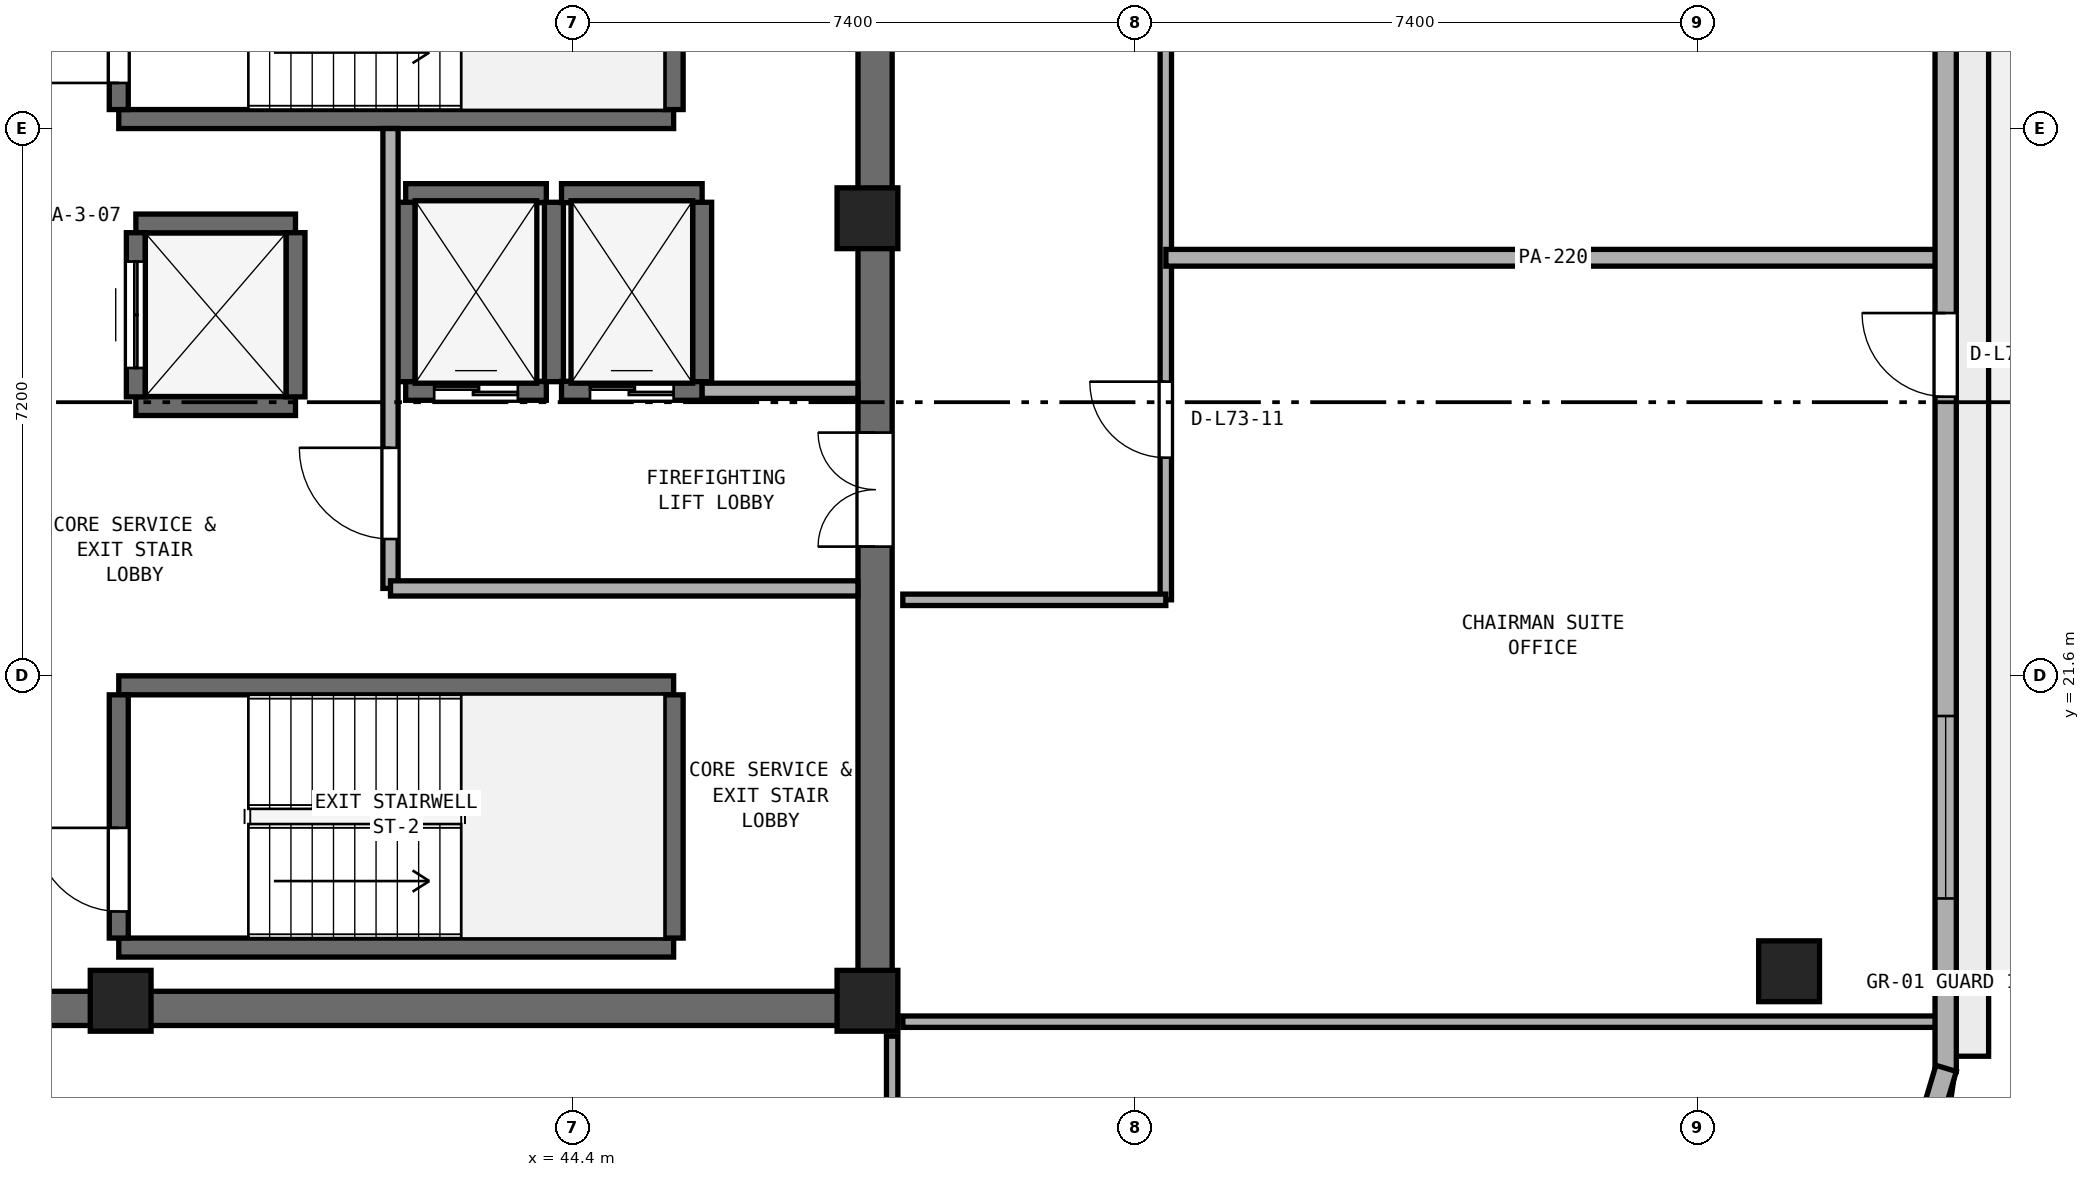
"""IFC4 building model, lengths in metres.
Left out: names, types, materials, properties, quantities, classifications, styles, units other than length and angle.
Written with IfcOpenShell. Run it as: python <this file> out.ifc"""

import sys

from ifc_helpers import new_model, si_unit, direction, frame, frame_2d, origin, origin_2d, place, context, subcontext, project, spatial, rectangle, extrude, element, fill, save


model = new_model("IFC4")
c1 = context("Model", 3, precision=1e-05, world=origin(), true_north=direction((0.0, 1.0)))
c2 = subcontext(c1, "Body", "Model", "MODEL_VIEW")
j1 = project(units=[si_unit("LENGTHUNIT", "METRE"), si_unit("PLANEANGLEUNIT", "RADIAN")], contexts=[c1])
p1 = place(None, origin())
s1 = spatial("IfcSite", under=j1, at=p1, CompositionType="ELEMENT")
p2 = place(p1, origin())
s2 = spatial("IfcBuilding", under=s1, at=p2, CompositionType="ELEMENT")
p3 = place(p2, frame((0.0, 0.0, 285.8)))
s3 = spatial("IfcBuildingStorey", under=s2, at=p3, CompositionType="ELEMENT", Elevation=285.8)
p4 = place(p3, frame((25.4, 17.225, 0.0), z_axis=(0.0, 0.0, 1.0), x_axis=(1.0, 0.0, 0.0)))
e1 = element("IfcWall", 1, at=p4, inside=s3, PredefinedType="SHEAR", context=c2, shape_type="SweptSolid", body=[
    extrude(rectangle(XDim=23.2, YDim=0.45, at=frame_2d((11.6, 0.0))), origin(), (0.0, 0.0, 1.0), 3.54),
])
p5 = place(p3, frame((48.375, 17.45, 0.0), z_axis=(0.0, 0.0, 1.0), x_axis=(0.0, 1.0, 0.0)))
e2 = element("IfcWall", 2, at=p5, inside=s3, PredefinedType="SHEAR", context=c2, shape_type="SweptSolid", body=[
    extrude(rectangle(XDim=15.5, YDim=0.45, at=frame_2d((7.75, 0.0))), origin(), (0.0, 0.0, 1.0), 3.54),
])
p6 = place(p5, frame((5.85, 0.0, 0.0)))
e3 = element("IfcOpeningElement", 3, at=p6, cuts=e2, PredefinedType="OPENING", context=c2, shape_type="SweptSolid", body=[
    extrude(rectangle(XDim=1.5, YDim=2.15, at=frame_2d((0.75, 1.075))), frame((0.0, 0.235, 0.0), z_axis=(0.0, -1.0, 0.0), x_axis=(1.0, 0.0, 0.0)), (0.0, 0.0, 1.0), 0.47),
])
for number, where, z_axis, x_axis in (
    (4, (38.45, 17.325, 0.0), (0.0, 0.0, 1.0), (1.0, 0.0, 0.0)),
    (5, (48.275, 17.325, 0.0), (0.0, 0.0, 1.0), (1.0, 0.0, 0.0)),
    (6, (48.275, 27.62, 0.0), (0.0, 0.0, 1.0), (1.0, 0.0, 0.0)),
):
    element("IfcColumn", number, at=place(p3, frame(where, z_axis=z_axis, x_axis=x_axis)), inside=s3, PredefinedType="PILASTER", context=c2, shape_type="SweptSolid", body=[
        extrude(rectangle(XDim=0.8, YDim=0.8, at=origin_2d()), origin(), (0.0, 0.0, 1.0), 3.8),
    ])
p7 = place(p3, frame((60.4, 17.714, 0.0), z_axis=(0.0, 0.0, 1.0), x_axis=(1.0, 0.0, 0.0)))
e7 = element("IfcColumn", 7, at=p7, inside=s3, PredefinedType="COLUMN", context=c2, shape_type="SweptSolid", body=[
    extrude(rectangle(XDim=0.8, YDim=0.8, at=origin_2d()), origin(), (0.0, 0.0, 1.0), 3.8),
])
p8 = place(p3, frame((38.425, 28.925, 0.0), z_axis=(0.0, 0.0, 1.0), x_axis=(1.0, 0.0, 0.0)))
e8 = element("IfcWall", 8, at=p8, inside=s3, PredefinedType="SHEAR", context=c2, shape_type="SweptSolid", body=[
    extrude(rectangle(XDim=7.3, YDim=0.25, at=frame_2d((3.65, 0.0))), origin(), (0.0, 0.0, 1.0), 3.54),
])
p9 = place(p3, frame((38.425, 29.05, 0.0), z_axis=(0.0, 0.0, 1.0), x_axis=(0.0, 1.0, 0.0)))
e9 = element("IfcWall", 9, at=p9, inside=s3, PredefinedType="SHEAR", context=c2, shape_type="SweptSolid", body=[
    extrude(rectangle(XDim=3.2, YDim=0.25, at=frame_2d((1.6, 0.0))), origin(), (0.0, 0.0, 1.0), 3.54),
])
p10 = place(p9, frame((0.35, 0.0, 0.0)))
e10 = element("IfcOpeningElement", 10, at=p10, cuts=e9, PredefinedType="OPENING", context=c2, shape_type="SweptSolid", body=[
    extrude(rectangle(XDim=1.1, YDim=2.15, at=frame_2d((0.55, 1.075))), frame((0.0, 0.135, 0.0), z_axis=(0.0, -1.0, 0.0), x_axis=(1.0, 0.0, 0.0)), (0.0, 0.0, 1.0), 0.27),
])
p11 = place(p3, frame((45.725, 29.05, 0.0), z_axis=(0.0, 0.0, 1.0), x_axis=(0.0, 1.0, 0.0)))
e11 = element("IfcWall", 11, at=p11, inside=s3, PredefinedType="SHEAR", context=c2, shape_type="SweptSolid", body=[
    extrude(rectangle(XDim=3.2, YDim=0.25, at=frame_2d((1.6, 0.0))), origin(), (0.0, 0.0, 1.0), 3.54),
])
for number, where, z_axis, x_axis in (
    (12, (38.425, 18.025, 0.0), (0.0, 0.0, 1.0), (1.0, 0.0, 0.0)),
    (13, (38.425, 21.475, 0.0), (0.0, 0.0, 1.0), (1.0, 0.0, 0.0)),
):
    element("IfcWall", number, at=place(p3, frame(where, z_axis=z_axis, x_axis=x_axis)), inside=s3, PredefinedType="SHEAR", context=c2, shape_type="SweptSolid", body=[
        extrude(rectangle(XDim=7.3, YDim=0.25, at=frame_2d((3.65, 0.0))), origin(), (0.0, 0.0, 1.0), 3.54),
    ])
p12 = place(p3, frame((38.425, 18.15, 0.0), z_axis=(0.0, 0.0, 1.0), x_axis=(0.0, 1.0, 0.0)))
e14 = element("IfcWall", 14, at=p12, inside=s3, PredefinedType="SHEAR", context=c2, shape_type="SweptSolid", body=[
    extrude(rectangle(XDim=3.2, YDim=0.25, at=frame_2d((1.6, 0.0))), origin(), (0.0, 0.0, 1.0), 3.54),
])
p13 = place(p12, frame((0.35, 0.0, 0.0)))
e15 = element("IfcOpeningElement", 15, at=p13, cuts=e14, PredefinedType="OPENING", context=c2, shape_type="SweptSolid", body=[
    extrude(rectangle(XDim=1.1, YDim=2.15, at=frame_2d((0.55, 1.075))), frame((0.0, 0.135, 0.0), z_axis=(0.0, -1.0, 0.0), x_axis=(1.0, 0.0, 0.0)), (0.0, 0.0, 1.0), 0.27),
])
p14 = place(p3, frame((45.725, 18.15, 0.0), z_axis=(0.0, 0.0, 1.0), x_axis=(0.0, 1.0, 0.0)))
e16 = element("IfcWall", 16, at=p14, inside=s3, PredefinedType="SHEAR", context=c2, shape_type="SweptSolid", body=[
    extrude(rectangle(XDim=3.2, YDim=0.25, at=frame_2d((1.6, 0.0))), origin(), (0.0, 0.0, 1.0), 3.54),
])
p15 = place(p3, frame((42.2, 25.35, 0.0), z_axis=(0.0, 0.0, 1.0), x_axis=(1.0, 0.0, 0.0)))
e17 = element("IfcWall", 17, at=p15, inside=s3, PredefinedType="SHEAR", context=c2, shape_type="SweptSolid", body=[
    extrude(rectangle(XDim=1.85, YDim=0.25, at=frame_2d((0.925, 0.0))), origin(), (0.0, 0.0, 1.0), 3.54),
])
p16 = place(p15, frame((0.375, 0.0, 0.0)))
e18 = element("IfcOpeningElement", 18, at=p16, cuts=e17, PredefinedType="OPENING", context=c2, shape_type="SweptSolid", body=[
    extrude(rectangle(XDim=1.1, YDim=2.15, at=frame_2d((0.55, 1.075))), frame((0.0, 0.135, 0.0), z_axis=(0.0, -1.0, 0.0), x_axis=(1.0, 0.0, 0.0)), (0.0, 0.0, 1.0), 0.27),
])
p17 = place(p3, frame((42.2, 27.95, 0.0), z_axis=(0.0, 0.0, 1.0), x_axis=(1.0, 0.0, 0.0)))
e19 = element("IfcWall", 19, at=p17, inside=s3, PredefinedType="SHEAR", context=c2, shape_type="SweptSolid", body=[
    extrude(rectangle(XDim=1.85, YDim=0.25, at=frame_2d((0.925, 0.0))), origin(), (0.0, 0.0, 1.0), 3.54),
])
for number, where, z_axis, x_axis in (
    (20, (42.2, 25.47, 0.0), (0.0, 0.0, 1.0), (0.0, 1.0, 0.0)),
    (21, (44.15, 25.47, 0.0), (0.0, 0.0, 1.0), (0.0, 1.0, 0.0)),
):
    element("IfcWall", number, at=place(p3, frame(where, z_axis=z_axis, x_axis=x_axis)), inside=s3, PredefinedType="SHEAR", context=c2, shape_type="SweptSolid", body=[
        extrude(rectangle(XDim=2.36, YDim=0.25, at=frame_2d((1.18, 0.0))), origin(), (0.0, 0.0, 1.0), 3.54),
    ])
p18 = place(p3, frame((44.25, 25.35, 0.0), z_axis=(0.0, 0.0, 1.0), x_axis=(1.0, 0.0, 0.0)))
e22 = element("IfcWall", 22, at=p18, inside=s3, PredefinedType="SHEAR", context=c2, shape_type="SweptSolid", body=[
    extrude(rectangle(XDim=1.85, YDim=0.25, at=frame_2d((0.925, 0.0))), origin(), (0.0, 0.0, 1.0), 3.54),
])
p19 = place(p18, frame((0.375, 0.0, 0.0)))
e23 = element("IfcOpeningElement", 23, at=p19, cuts=e22, PredefinedType="OPENING", context=c2, shape_type="SweptSolid", body=[
    extrude(rectangle(XDim=1.1, YDim=2.15, at=frame_2d((0.55, 1.075))), frame((0.0, 0.135, 0.0), z_axis=(0.0, -1.0, 0.0), x_axis=(1.0, 0.0, 0.0)), (0.0, 0.0, 1.0), 0.27),
])
p20 = place(p3, frame((44.25, 27.95, 0.0), z_axis=(0.0, 0.0, 1.0), x_axis=(1.0, 0.0, 0.0)))
e24 = element("IfcWall", 24, at=p20, inside=s3, PredefinedType="SHEAR", context=c2, shape_type="SweptSolid", body=[
    extrude(rectangle(XDim=1.85, YDim=0.25, at=frame_2d((0.925, 0.0))), origin(), (0.0, 0.0, 1.0), 3.54),
])
p21 = place(p3, frame((46.1, 25.47, 0.0), z_axis=(0.0, 0.0, 1.0), x_axis=(0.0, 1.0, 0.0)))
e25 = element("IfcWall", 25, at=p21, inside=s3, PredefinedType="SHEAR", context=c2, shape_type="SweptSolid", body=[
    extrude(rectangle(XDim=2.36, YDim=0.25, at=frame_2d((1.18, 0.0))), origin(), (0.0, 0.0, 1.0), 3.54),
])
for number, where, z_axis, x_axis in (
    (26, (38.65, 25.15, 0.0), (0.0, 0.0, 1.0), (1.0, 0.0, 0.0)),
    (27, (38.65, 27.55, 0.0), (0.0, 0.0, 1.0), (1.0, 0.0, 0.0)),
):
    element("IfcWall", number, at=place(p3, frame(where, z_axis=z_axis, x_axis=x_axis)), inside=s3, PredefinedType="SHEAR", context=c2, shape_type="SweptSolid", body=[
        extrude(rectangle(XDim=2.1, YDim=0.25, at=frame_2d((1.05, 0.0))), origin(), (0.0, 0.0, 1.0), 3.54),
    ])
p22 = place(p3, frame((38.65, 25.27, 0.0), z_axis=(0.0, 0.0, 1.0), x_axis=(0.0, 1.0, 0.0)))
e28 = element("IfcWall", 28, at=p22, inside=s3, PredefinedType="SHEAR", context=c2, shape_type="SweptSolid", body=[
    extrude(rectangle(XDim=2.16, YDim=0.25, at=frame_2d((1.08, 0.0))), origin(), (0.0, 0.0, 1.0), 3.54),
])
p23 = place(p22, frame((0.38, 0.0, 0.0)))
e29 = element("IfcOpeningElement", 29, at=p23, cuts=e28, PredefinedType="OPENING", context=c2, shape_type="SweptSolid", body=[
    extrude(rectangle(XDim=1.4, YDim=2.2, at=frame_2d((0.7, 1.1))), frame((0.0, 0.135, 0.0), z_axis=(0.0, -1.0, 0.0), x_axis=(1.0, 0.0, 0.0)), (0.0, 0.0, 1.0), 0.27),
])
p24 = place(p3, frame((40.75, 25.27, 0.0), z_axis=(0.0, 0.0, 1.0), x_axis=(0.0, 1.0, 0.0)))
e30 = element("IfcWall", 30, at=p24, inside=s3, PredefinedType="SHEAR", context=c2, shape_type="SweptSolid", body=[
    extrude(rectangle(XDim=2.16, YDim=0.25, at=frame_2d((1.08, 0.0))), origin(), (0.0, 0.0, 1.0), 3.54),
])
p25 = place(p3, frame((42.0, 22.75, 0.0), z_axis=(0.0, 0.0, 1.0), x_axis=(0.0, 1.0, 0.0)))
e31 = element("IfcWall", 31, at=p25, inside=s3, PredefinedType="SOLIDWALL", context=c2, shape_type="SweptSolid", body=[
    extrude(rectangle(XDim=6.05, YDim=0.2, at=frame_2d((3.025, 0.0))), origin(), (0.0, 0.0, 1.0), 3.54),
])
p26 = place(p25, frame((0.65, 0.0, 0.0)))
e32 = element("IfcOpeningElement", 32, at=p26, cuts=e31, PredefinedType="OPENING", context=c2, shape_type="SweptSolid", body=[
    extrude(rectangle(XDim=1.2, YDim=2.15, at=frame_2d((0.6, 1.075))), frame((0.0, 0.11, 0.0), z_axis=(0.0, -1.0, 0.0), x_axis=(1.0, 0.0, 0.0)), (0.0, 0.0, 1.0), 0.22),
])
p27 = place(p3, frame((42.0, 22.75, 0.0), z_axis=(0.0, 0.0, 1.0), x_axis=(1.0, 0.0, 0.0)))
e33 = element("IfcWall", 33, at=p27, inside=s3, PredefinedType="SOLIDWALL", context=c2, shape_type="SweptSolid", body=[
    extrude(rectangle(XDim=6.15, YDim=0.2, at=frame_2d((3.075, 0.0))), origin(), (0.0, 0.0, 1.0), 3.54),
])
p28 = place(p3, frame((46.1, 25.35, 0.0), z_axis=(0.0, 0.0, 1.0), x_axis=(1.0, 0.0, 0.0)))
e34 = element("IfcWall", 34, at=p28, inside=s3, PredefinedType="SOLIDWALL", context=c2, shape_type="SweptSolid", body=[
    extrude(rectangle(XDim=2.05, YDim=0.2, at=frame_2d((1.025, 0.0))), origin(), (0.0, 0.0, 1.0), 3.54),
])
p29 = place(p3, frame((52.2, 22.6, 0.0), z_axis=(0.0, 0.0, 1.0), x_axis=(0.0, 1.0, 0.0)))
e35 = element("IfcWall", 35, at=p29, inside=s3, PredefinedType="PARTITIONING", context=c2, shape_type="SweptSolid", body=[
    extrude(rectangle(XDim=22.153, YDim=0.15, at=frame_2d((11.076, 0.0))), origin(), (0.0, 0.0, 1.0), 3.54),
])
p30 = place(p29, frame((1.87, 0.0, 0.0)))
e36 = element("IfcOpeningElement", 36, at=p30, cuts=e35, PredefinedType="OPENING", context=c2, shape_type="SweptSolid", body=[
    extrude(rectangle(XDim=1.0, YDim=2.12, at=frame_2d((0.5, 1.06))), frame((0.0, 0.085, 0.0), z_axis=(0.0, -1.0, 0.0), x_axis=(1.0, 0.0, 0.0)), (0.0, 0.0, 1.0), 0.17),
])
p31 = place(p29, frame((8.95, 0.0, 0.0)))
e37 = element("IfcOpeningElement", 37, at=p31, cuts=e35, PredefinedType="OPENING", context=c2, shape_type="SweptSolid", body=[
    extrude(rectangle(XDim=1.0, YDim=2.12, at=frame_2d((0.5, 1.06))), frame((0.0, 0.085, 0.0), z_axis=(0.0, -1.0, 0.0), x_axis=(1.0, 0.0, 0.0)), (0.0, 0.0, 1.0), 0.17),
])
p32 = place(p3, frame((48.6, 13.4, 0.0), z_axis=(0.0, 0.0, 1.0), x_axis=(0.0, 1.0, 0.0)))
e38 = element("IfcWall", 38, at=p32, inside=s3, PredefinedType="PARTITIONING", context=c2, shape_type="SweptSolid", body=[
    extrude(rectangle(XDim=3.46, YDim=0.15, at=frame_2d((1.73, 0.0))), origin(), (0.0, 0.0, 1.0), 3.54),
])
p33 = place(p3, frame((48.74, 17.05, 0.0), z_axis=(0.0, 0.0, 1.0), x_axis=(1.0, 0.0, 0.0)))
e39 = element("IfcWall", 39, at=p33, inside=s3, PredefinedType="PARTITIONING", context=c2, shape_type="SweptSolid", body=[
    extrude(rectangle(XDim=13.655, YDim=0.15, at=frame_2d((6.828, 0.0))), origin(), (0.0, 0.0, 1.0), 2.923),
])
p34 = place(p3, frame((48.74, 22.6, 0.0), z_axis=(0.0, 0.0, 1.0), x_axis=(1.0, 0.0, 0.0)))
e40 = element("IfcWall", 40, at=p34, inside=s3, PredefinedType="PARTITIONING", context=c2, shape_type="SweptSolid", body=[
    extrude(rectangle(XDim=3.46, YDim=0.15, at=frame_2d((1.73, 0.0))), origin(), (0.0, 0.0, 1.0), 3.54),
])
p35 = place(p3, frame((52.201, 27.1, 0.0), z_axis=(0.0, 0.0, 1.0), x_axis=(1.0, 0.0, 0.0)))
e41 = element("IfcWall", 41, at=p35, inside=s3, PredefinedType="PARTITIONING", context=c2, shape_type="SweptSolid", body=[
    extrude(rectangle(XDim=10.194, YDim=0.22, at=frame_2d((5.097, 0.0))), origin(), (0.0, 0.0, 1.0), 3.54),
])
p36 = place(p3, frame((62.46, 16.396, 0.0), z_axis=(0.0, 0.0, 1.0), x_axis=(0.0, 1.0, 0.0)))
e42 = element("IfcWall", 42, at=p36, inside=s3, PredefinedType="STANDARD", context=c2, shape_type="SweptSolid", body=[
    extrude(rectangle(XDim=18.854, YDim=0.28, at=frame_2d((9.427, 0.0))), origin(), (0.0, 0.0, 1.0), 3.54),
])
p37 = place(p36, frame((8.877, 0.0, 0.0)))
e43 = element("IfcOpeningElement", 43, at=p37, cuts=e42, PredefinedType="OPENING", context=c2, shape_type="SweptSolid", body=[
    extrude(rectangle(XDim=1.1, YDim=2.2, at=frame_2d((0.55, 1.1))), frame((0.0, 0.15, 0.0), z_axis=(0.0, -1.0, 0.0), x_axis=(1.0, 0.0, 0.0)), (0.0, 0.0, 1.0), 0.3),
])
p38 = place(p36, frame((2.276, 0.0, 0.9)))
e44 = element("IfcOpeningElement", 44, at=p38, cuts=e42, PredefinedType="OPENING", context=c2, shape_type="SweptSolid", body=[
    extrude(rectangle(XDim=2.4, YDim=1.75, at=frame_2d((1.2, 0.875))), frame((0.0, 0.15, 0.0), z_axis=(0.0, -1.0, 0.0), x_axis=(1.0, 0.0, 0.0)), (0.0, 0.0, 1.0), 0.3),
])
p39 = place(p36, frame((14.179, 0.0, 0.9)))
e45 = element("IfcOpeningElement", 45, at=p39, cuts=e42, PredefinedType="OPENING", context=c2, shape_type="SweptSolid", body=[
    extrude(rectangle(XDim=2.4, YDim=1.75, at=frame_2d((1.2, 0.875))), frame((0.0, 0.15, 0.0), z_axis=(0.0, -1.0, 0.0), x_axis=(1.0, 0.0, 0.0)), (0.0, 0.0, 1.0), 0.3),
])
p40 = place(p3, frame((61.839, 14.344, 0.0), z_axis=(0.0, 0.0, 1.0), x_axis=(0.287235049694, 0.957860128739, 0.0)))
e46 = element("IfcWall", 46, at=p40, inside=s3, PredefinedType="STANDARD", context=c2, shape_type="SweptSolid", body=[
    extrude(rectangle(XDim=2.184, YDim=0.28, at=frame_2d((1.092, 0.0))), origin(), (0.0, 0.0, 1.0), 3.54),
])
p41 = place(p10, origin())
e47 = element("IfcDoor", 47, at=p41, inside=s3, OperationType="SINGLE_SWING_LEFT", PredefinedType="DOOR", context=c2, shape_type="SweptSolid", body=[
    extrude(rectangle(XDim=1.1, YDim=2.15, at=frame_2d((0.55, 1.075))), frame((0.0, 0.025, 0.0), z_axis=(0.0, -1.0, 0.0), x_axis=(1.0, 0.0, 0.0)), (0.0, 0.0, 1.0), 0.05),
])
fill(e10, e47)
p42 = place(p13, origin())
e48 = element("IfcDoor", 48, at=p42, inside=s3, OperationType="SINGLE_SWING_RIGHT", PredefinedType="DOOR", context=c2, shape_type="SweptSolid", body=[
    extrude(rectangle(XDim=1.1, YDim=2.15, at=frame_2d((0.55, 1.075))), frame((0.0, 0.025, 0.0), z_axis=(0.0, -1.0, 0.0), x_axis=(1.0, 0.0, 0.0)), (0.0, 0.0, 1.0), 0.05),
])
fill(e15, e48)
p43 = place(p16, origin())
e49 = element("IfcDoor", 49, at=p43, inside=s3, OperationType="DOUBLE_DOOR_SLIDING", PredefinedType="DOOR", context=c2, shape_type="SweptSolid", body=[
    extrude(rectangle(XDim=1.1, YDim=2.15, at=frame_2d((0.55, 1.075))), frame((0.0, 0.025, 0.0), z_axis=(0.0, -1.0, 0.0), x_axis=(1.0, 0.0, 0.0)), (0.0, 0.0, 1.0), 0.05),
])
fill(e18, e49)
p44 = place(p19, origin())
e50 = element("IfcDoor", 50, at=p44, inside=s3, OperationType="DOUBLE_DOOR_SLIDING", PredefinedType="DOOR", context=c2, shape_type="SweptSolid", body=[
    extrude(rectangle(XDim=1.1, YDim=2.15, at=frame_2d((0.55, 1.075))), frame((0.0, 0.025, 0.0), z_axis=(0.0, -1.0, 0.0), x_axis=(1.0, 0.0, 0.0)), (0.0, 0.0, 1.0), 0.05),
])
fill(e23, e50)
p45 = place(p23, origin())
e51 = element("IfcDoor", 51, at=p45, inside=s3, OperationType="DOUBLE_DOOR_SLIDING", PredefinedType="DOOR", context=c2, shape_type="SweptSolid", body=[
    extrude(rectangle(XDim=1.4, YDim=2.2, at=frame_2d((0.7, 1.1))), frame((0.0, 0.025, 0.0), z_axis=(0.0, -1.0, 0.0), x_axis=(1.0, 0.0, 0.0)), (0.0, 0.0, 1.0), 0.05),
])
fill(e29, e51)
p46 = place(p26, origin())
e52 = element("IfcDoor", 52, at=p46, inside=s3, OperationType="SINGLE_SWING_RIGHT", PredefinedType="DOOR", context=c2, shape_type="SweptSolid", body=[
    extrude(rectangle(XDim=1.2, YDim=2.15, at=frame_2d((0.6, 1.075))), frame((0.0, 0.025, 0.0), z_axis=(0.0, -1.0, 0.0), x_axis=(1.0, 0.0, 0.0)), (0.0, 0.0, 1.0), 0.05),
])
fill(e32, e52)
p47 = place(p6, origin())
e53 = element("IfcDoor", 53, at=p47, inside=s3, OperationType="DOUBLE_DOOR_SINGLE_SWING", PredefinedType="DOOR", context=c2, shape_type="SweptSolid", body=[
    extrude(rectangle(XDim=1.5, YDim=2.15, at=frame_2d((0.75, 1.075))), frame((0.0, 0.025, 0.0), z_axis=(0.0, -1.0, 0.0), x_axis=(1.0, 0.0, 0.0)), (0.0, 0.0, 1.0), 0.05),
])
fill(e3, e53)
p48 = place(p30, origin())
e54 = element("IfcDoor", 54, at=p48, inside=s3, OperationType="SINGLE_SWING_RIGHT", PredefinedType="DOOR", context=c2, shape_type="SweptSolid", body=[
    extrude(rectangle(XDim=1.0, YDim=2.12, at=frame_2d((0.5, 1.06))), frame((0.0, 0.025, 0.0), z_axis=(0.0, -1.0, 0.0), x_axis=(1.0, 0.0, 0.0)), (0.0, 0.0, 1.0), 0.05),
])
fill(e36, e54)
p49 = place(p37, origin())
e55 = element("IfcDoor", 55, at=p49, inside=s3, OperationType="SINGLE_SWING_RIGHT", PredefinedType="DOOR", context=c2, shape_type="SweptSolid", body=[
    extrude(rectangle(XDim=1.1, YDim=2.2, at=frame_2d((0.55, 1.1))), frame((0.0, 0.025, 0.0), z_axis=(0.0, -1.0, 0.0), x_axis=(1.0, 0.0, 0.0)), (0.0, 0.0, 1.0), 0.05),
])
fill(e43, e55)
p50 = place(p38, origin())
e56 = element("IfcWindow", 56, at=p50, inside=s3, PartitioningType="SINGLE_PANEL", PredefinedType="WINDOW", context=c2, shape_type="SweptSolid", body=[
    extrude(rectangle(XDim=2.4, YDim=1.75, at=frame_2d((1.2, 0.875))), frame((0.0, 0.03, 0.0), z_axis=(0.0, -1.0, 0.0), x_axis=(1.0, 0.0, 0.0)), (0.0, 0.0, 1.0), 0.06),
])
fill(e44, e56)
save(model, sys.argv[1])
